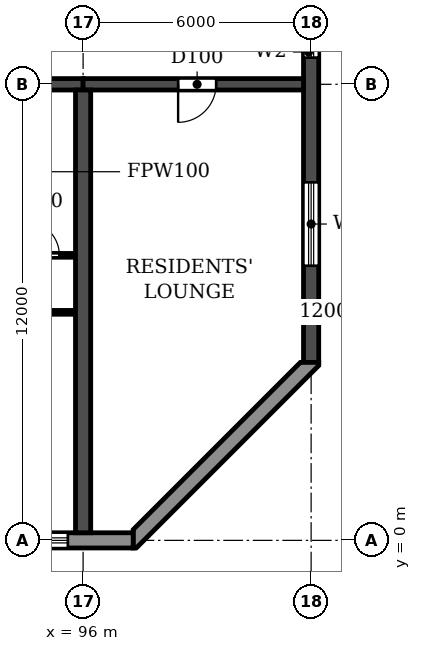
"""IFC4 building model, lengths in metres.
Left out: names, types, materials, properties, quantities, classifications, styles, units other than length and angle.
Written with IfcOpenShell. Run it as: python <this file> out.ifc"""

import sys

from ifc_helpers import new_model, si_unit, direction, frame, frame_2d, origin, place, context, subcontext, project, spatial, polyline, rectangle, outline, extrude, element, fill, save


model = new_model("IFC4")
c1 = context("Model", 3, precision=1e-05, world=origin(), true_north=direction((0.0, 1.0)))
c2 = subcontext(c1, "Body", "Model", "MODEL_VIEW")
j1 = project(units=[si_unit("LENGTHUNIT", "METRE"), si_unit("PLANEANGLEUNIT", "RADIAN")], contexts=[c1])
p1 = place(None, origin())
s1 = spatial("IfcSite", under=j1, at=p1, CompositionType="ELEMENT")
p2 = place(p1, origin())
s2 = spatial("IfcBuilding", under=s1, at=p2, CompositionType="ELEMENT")
p3 = place(p2, frame((0.0, 0.0, 26.7)))
s3 = spatial("IfcBuildingStorey", under=s2, at=p3, CompositionType="ELEMENT", Elevation=26.7)
p4 = place(p3, frame((96.0, 0.2, 0.0), z_axis=(0.0, 0.0, 1.0), x_axis=(0.0, 1.0, 0.0)))
e1 = element("IfcWall", 1, at=p4, inside=s3, PredefinedType="SHEAR", context=c2, shape_type="SweptSolid", body=[
    extrude(rectangle(XDim=11.65, YDim=0.4, at=frame_2d((5.825, 0.0))), origin(), (0.0, 0.0, 1.0), 3.05),
])
p5 = place(p3, frame((102.0, 4.683, 0.0), z_axis=(0.0, 0.0, 1.0), x_axis=(0.0, 1.0, 0.0)))
e2 = element("IfcWall", 2, at=p5, inside=s3, PredefinedType="SHEAR", context=c2, shape_type="SweptSolid", body=[
    extrude(rectangle(XDim=35.434, YDim=0.4, at=frame_2d((17.717, 0.0))), origin(), (0.0, 0.0, 1.0), 3.05),
])
p6 = place(p5, frame((15.917, 0.0, 0.9)))
e3 = element("IfcOpeningElement", 3, at=p6, cuts=e2, PredefinedType="OPENING", context=c2, shape_type="SweptSolid", body=[
    extrude(rectangle(XDim=1.2, YDim=1.5, at=frame_2d((0.6, 0.75))), frame((0.0, 0.21, 0.0), z_axis=(0.0, -1.0, 0.0), x_axis=(1.0, 0.0, 0.0)), (0.0, 0.0, 1.0), 0.42),
])
p7 = place(p5, frame((23.817, 0.0, 0.9)))
e4 = element("IfcOpeningElement", 4, at=p7, cuts=e2, PredefinedType="OPENING", context=c2, shape_type="SweptSolid", body=[
    extrude(rectangle(XDim=1.2, YDim=1.5, at=frame_2d((0.6, 0.75))), frame((0.0, 0.21, 0.0), z_axis=(0.0, -1.0, 0.0), x_axis=(1.0, 0.0, 0.0)), (0.0, 0.0, 1.0), 0.42),
])
p8 = place(p5, frame((8.017, 0.0, 0.9)))
e5 = element("IfcOpeningElement", 5, at=p8, cuts=e2, PredefinedType="OPENING", context=c2, shape_type="SweptSolid", body=[
    extrude(rectangle(XDim=1.2, YDim=1.5, at=frame_2d((0.6, 0.75))), frame((0.0, 0.21, 0.0), z_axis=(0.0, -1.0, 0.0), x_axis=(1.0, 0.0, 0.0)), (0.0, 0.0, 1.0), 0.42),
])
p9 = place(p5, frame((29.493, 0.0, 0.6)))
e6 = element("IfcOpeningElement", 6, at=p9, cuts=e2, PredefinedType="OPENING", context=c2, shape_type="SweptSolid", body=[
    extrude(rectangle(XDim=2.2, YDim=1.8, at=frame_2d((1.1, 0.9))), frame((0.0, 0.21, 0.0), z_axis=(0.0, -1.0, 0.0), x_axis=(1.0, 0.0, 0.0)), (0.0, 0.0, 1.0), 0.42),
])
p10 = place(p5, frame((2.541, 0.0, 0.6)))
e7 = element("IfcOpeningElement", 7, at=p10, cuts=e2, PredefinedType="OPENING", context=c2, shape_type="SweptSolid", body=[
    extrude(rectangle(XDim=2.2, YDim=1.8, at=frame_2d((1.1, 0.9))), frame((0.0, 0.21, 0.0), z_axis=(0.0, -1.0, 0.0), x_axis=(1.0, 0.0, 0.0)), (0.0, 0.0, 1.0), 0.42),
])
p11 = place(p3, frame((90.0, 12.0, 0.0), z_axis=(0.0, 0.0, 1.0), x_axis=(1.0, 0.0, 0.0)))
e8 = element("IfcWall", 8, at=p11, inside=s3, PredefinedType="SHEAR", context=c2, shape_type="SweptSolid", body=[
    extrude(rectangle(XDim=6.0, YDim=0.3, at=frame_2d((3.0, 0.0))), origin(), (0.0, 0.0, 1.0), 2.45),
])
p12 = place(p11, frame((2.45, 0.0, 0.0)))
e9 = element("IfcOpeningElement", 9, at=p12, cuts=e8, PredefinedType="OPENING", context=c2, shape_type="SweptSolid", body=[
    extrude(rectangle(XDim=1.0, YDim=2.1, at=frame_2d((0.5, 1.05))), frame((0.0, 0.16, 0.0), z_axis=(0.0, -1.0, 0.0), x_axis=(1.0, 0.0, 0.0)), (0.0, 0.0, 1.0), 0.32),
])
p13 = place(p3, frame((96.0, 12.0, 0.0), z_axis=(0.0, 0.0, 1.0), x_axis=(1.0, 0.0, 0.0)))
e10 = element("IfcWall", 10, at=p13, inside=s3, PredefinedType="SHEAR", context=c2, shape_type="SweptSolid", body=[
    extrude(rectangle(XDim=5.8, YDim=0.3, at=frame_2d((2.9, 0.0))), origin(), (0.0, 0.0, 1.0), 2.45),
])
p14 = place(p13, frame((2.5, 0.0, 0.0)))
e11 = element("IfcOpeningElement", 11, at=p14, cuts=e10, PredefinedType="OPENING", context=c2, shape_type="SweptSolid", body=[
    extrude(rectangle(XDim=1.0, YDim=2.1, at=frame_2d((0.5, 1.05))), frame((0.0, 0.16, 0.0), z_axis=(0.0, -1.0, 0.0), x_axis=(1.0, 0.0, 0.0)), (0.0, 0.0, 1.0), 0.32),
])
p15 = place(p3, frame((4.683, 0.0, 0.0), z_axis=(0.0, 0.0, 1.0), x_axis=(1.0, 0.0, 0.0)))
e12 = element("IfcWall", 12, at=p15, inside=s3, PredefinedType="STANDARD", context=c2, shape_type="SweptSolid", body=[
    extrude(rectangle(XDim=92.634, YDim=0.4, at=frame_2d((46.317, 0.0))), origin(), (0.0, 0.0, 1.0), 3.05),
])
p16 = place(p15, frame((1.717, 0.0, 0.9)))
e13 = element("IfcOpeningElement", 13, at=p16, cuts=e12, PredefinedType="OPENING", context=c2, shape_type="SweptSolid", body=[
    extrude(rectangle(XDim=2.2, YDim=1.5, at=frame_2d((1.1, 0.75))), frame((0.0, 0.21, 0.0), z_axis=(0.0, -1.0, 0.0), x_axis=(1.0, 0.0, 0.0)), (0.0, 0.0, 1.0), 0.42),
])
p17 = place(p15, frame((4.717, 0.0, 0.9)))
e14 = element("IfcOpeningElement", 14, at=p17, cuts=e12, PredefinedType="OPENING", context=c2, shape_type="SweptSolid", body=[
    extrude(rectangle(XDim=2.2, YDim=1.5, at=frame_2d((1.1, 0.75))), frame((0.0, 0.21, 0.0), z_axis=(0.0, -1.0, 0.0), x_axis=(1.0, 0.0, 0.0)), (0.0, 0.0, 1.0), 0.42),
])
p18 = place(p15, frame((7.717, 0.0, 0.9)))
e15 = element("IfcOpeningElement", 15, at=p18, cuts=e12, PredefinedType="OPENING", context=c2, shape_type="SweptSolid", body=[
    extrude(rectangle(XDim=2.2, YDim=1.5, at=frame_2d((1.1, 0.75))), frame((0.0, 0.21, 0.0), z_axis=(0.0, -1.0, 0.0), x_axis=(1.0, 0.0, 0.0)), (0.0, 0.0, 1.0), 0.42),
])
p19 = place(p15, frame((10.717, 0.0, 0.9)))
e16 = element("IfcOpeningElement", 16, at=p19, cuts=e12, PredefinedType="OPENING", context=c2, shape_type="SweptSolid", body=[
    extrude(rectangle(XDim=2.2, YDim=1.5, at=frame_2d((1.1, 0.75))), frame((0.0, 0.21, 0.0), z_axis=(0.0, -1.0, 0.0), x_axis=(1.0, 0.0, 0.0)), (0.0, 0.0, 1.0), 0.42),
])
p20 = place(p15, frame((13.717, 0.0, 0.9)))
e17 = element("IfcOpeningElement", 17, at=p20, cuts=e12, PredefinedType="OPENING", context=c2, shape_type="SweptSolid", body=[
    extrude(rectangle(XDim=2.2, YDim=1.5, at=frame_2d((1.1, 0.75))), frame((0.0, 0.21, 0.0), z_axis=(0.0, -1.0, 0.0), x_axis=(1.0, 0.0, 0.0)), (0.0, 0.0, 1.0), 0.42),
])
p21 = place(p15, frame((16.717, 0.0, 0.9)))
e18 = element("IfcOpeningElement", 18, at=p21, cuts=e12, PredefinedType="OPENING", context=c2, shape_type="SweptSolid", body=[
    extrude(rectangle(XDim=2.2, YDim=1.5, at=frame_2d((1.1, 0.75))), frame((0.0, 0.21, 0.0), z_axis=(0.0, -1.0, 0.0), x_axis=(1.0, 0.0, 0.0)), (0.0, 0.0, 1.0), 0.42),
])
p22 = place(p15, frame((19.917, 0.0, 0.0)))
e19 = element("IfcOpeningElement", 19, at=p22, cuts=e12, PredefinedType="OPENING", context=c2, shape_type="SweptSolid", body=[
    extrude(rectangle(XDim=1.8, YDim=2.4, at=frame_2d((0.9, 1.2))), frame((0.0, 0.21, 0.0), z_axis=(0.0, -1.0, 0.0), x_axis=(1.0, 0.0, 0.0)), (0.0, 0.0, 1.0), 0.42),
])
p23 = place(p15, frame((22.717, 0.0, 0.9)))
e20 = element("IfcOpeningElement", 20, at=p23, cuts=e12, PredefinedType="OPENING", context=c2, shape_type="SweptSolid", body=[
    extrude(rectangle(XDim=2.2, YDim=1.5, at=frame_2d((1.1, 0.75))), frame((0.0, 0.21, 0.0), z_axis=(0.0, -1.0, 0.0), x_axis=(1.0, 0.0, 0.0)), (0.0, 0.0, 1.0), 0.42),
])
p24 = place(p15, frame((25.717, 0.0, 0.9)))
e21 = element("IfcOpeningElement", 21, at=p24, cuts=e12, PredefinedType="OPENING", context=c2, shape_type="SweptSolid", body=[
    extrude(rectangle(XDim=2.2, YDim=1.5, at=frame_2d((1.1, 0.75))), frame((0.0, 0.21, 0.0), z_axis=(0.0, -1.0, 0.0), x_axis=(1.0, 0.0, 0.0)), (0.0, 0.0, 1.0), 0.42),
])
p25 = place(p15, frame((28.717, 0.0, 0.9)))
e22 = element("IfcOpeningElement", 22, at=p25, cuts=e12, PredefinedType="OPENING", context=c2, shape_type="SweptSolid", body=[
    extrude(rectangle(XDim=2.2, YDim=1.5, at=frame_2d((1.1, 0.75))), frame((0.0, 0.21, 0.0), z_axis=(0.0, -1.0, 0.0), x_axis=(1.0, 0.0, 0.0)), (0.0, 0.0, 1.0), 0.42),
])
p26 = place(p15, frame((31.917, 0.0, 0.0)))
e23 = element("IfcOpeningElement", 23, at=p26, cuts=e12, PredefinedType="OPENING", context=c2, shape_type="SweptSolid", body=[
    extrude(rectangle(XDim=1.8, YDim=2.4, at=frame_2d((0.9, 1.2))), frame((0.0, 0.21, 0.0), z_axis=(0.0, -1.0, 0.0), x_axis=(1.0, 0.0, 0.0)), (0.0, 0.0, 1.0), 0.42),
])
p27 = place(p15, frame((34.717, 0.0, 0.9)))
e24 = element("IfcOpeningElement", 24, at=p27, cuts=e12, PredefinedType="OPENING", context=c2, shape_type="SweptSolid", body=[
    extrude(rectangle(XDim=2.2, YDim=1.5, at=frame_2d((1.1, 0.75))), frame((0.0, 0.21, 0.0), z_axis=(0.0, -1.0, 0.0), x_axis=(1.0, 0.0, 0.0)), (0.0, 0.0, 1.0), 0.42),
])
p28 = place(p15, frame((37.717, 0.0, 0.9)))
e25 = element("IfcOpeningElement", 25, at=p28, cuts=e12, PredefinedType="OPENING", context=c2, shape_type="SweptSolid", body=[
    extrude(rectangle(XDim=2.2, YDim=1.5, at=frame_2d((1.1, 0.75))), frame((0.0, 0.21, 0.0), z_axis=(0.0, -1.0, 0.0), x_axis=(1.0, 0.0, 0.0)), (0.0, 0.0, 1.0), 0.42),
])
p29 = place(p15, frame((40.717, 0.0, 0.9)))
e26 = element("IfcOpeningElement", 26, at=p29, cuts=e12, PredefinedType="OPENING", context=c2, shape_type="SweptSolid", body=[
    extrude(rectangle(XDim=2.2, YDim=1.5, at=frame_2d((1.1, 0.75))), frame((0.0, 0.21, 0.0), z_axis=(0.0, -1.0, 0.0), x_axis=(1.0, 0.0, 0.0)), (0.0, 0.0, 1.0), 0.42),
])
p30 = place(p15, frame((43.917, 0.0, 0.0)))
e27 = element("IfcOpeningElement", 27, at=p30, cuts=e12, PredefinedType="OPENING", context=c2, shape_type="SweptSolid", body=[
    extrude(rectangle(XDim=1.8, YDim=2.4, at=frame_2d((0.9, 1.2))), frame((0.0, 0.21, 0.0), z_axis=(0.0, -1.0, 0.0), x_axis=(1.0, 0.0, 0.0)), (0.0, 0.0, 1.0), 0.42),
])
p31 = place(p15, frame((46.717, 0.0, 0.9)))
e28 = element("IfcOpeningElement", 28, at=p31, cuts=e12, PredefinedType="OPENING", context=c2, shape_type="SweptSolid", body=[
    extrude(rectangle(XDim=2.2, YDim=1.5, at=frame_2d((1.1, 0.75))), frame((0.0, 0.21, 0.0), z_axis=(0.0, -1.0, 0.0), x_axis=(1.0, 0.0, 0.0)), (0.0, 0.0, 1.0), 0.42),
])
p32 = place(p15, frame((49.717, 0.0, 0.9)))
e29 = element("IfcOpeningElement", 29, at=p32, cuts=e12, PredefinedType="OPENING", context=c2, shape_type="SweptSolid", body=[
    extrude(rectangle(XDim=2.2, YDim=1.5, at=frame_2d((1.1, 0.75))), frame((0.0, 0.21, 0.0), z_axis=(0.0, -1.0, 0.0), x_axis=(1.0, 0.0, 0.0)), (0.0, 0.0, 1.0), 0.42),
])
p33 = place(p15, frame((52.717, 0.0, 0.9)))
e30 = element("IfcOpeningElement", 30, at=p33, cuts=e12, PredefinedType="OPENING", context=c2, shape_type="SweptSolid", body=[
    extrude(rectangle(XDim=2.2, YDim=1.5, at=frame_2d((1.1, 0.75))), frame((0.0, 0.21, 0.0), z_axis=(0.0, -1.0, 0.0), x_axis=(1.0, 0.0, 0.0)), (0.0, 0.0, 1.0), 0.42),
])
p34 = place(p15, frame((55.717, 0.0, 0.9)))
e31 = element("IfcOpeningElement", 31, at=p34, cuts=e12, PredefinedType="OPENING", context=c2, shape_type="SweptSolid", body=[
    extrude(rectangle(XDim=2.2, YDim=1.5, at=frame_2d((1.1, 0.75))), frame((0.0, 0.21, 0.0), z_axis=(0.0, -1.0, 0.0), x_axis=(1.0, 0.0, 0.0)), (0.0, 0.0, 1.0), 0.42),
])
p35 = place(p15, frame((58.917, 0.0, 0.0)))
e32 = element("IfcOpeningElement", 32, at=p35, cuts=e12, PredefinedType="OPENING", context=c2, shape_type="SweptSolid", body=[
    extrude(rectangle(XDim=1.8, YDim=2.4, at=frame_2d((0.9, 1.2))), frame((0.0, 0.21, 0.0), z_axis=(0.0, -1.0, 0.0), x_axis=(1.0, 0.0, 0.0)), (0.0, 0.0, 1.0), 0.42),
])
p36 = place(p15, frame((61.717, 0.0, 0.9)))
e33 = element("IfcOpeningElement", 33, at=p36, cuts=e12, PredefinedType="OPENING", context=c2, shape_type="SweptSolid", body=[
    extrude(rectangle(XDim=2.2, YDim=1.5, at=frame_2d((1.1, 0.75))), frame((0.0, 0.21, 0.0), z_axis=(0.0, -1.0, 0.0), x_axis=(1.0, 0.0, 0.0)), (0.0, 0.0, 1.0), 0.42),
])
p37 = place(p15, frame((64.717, 0.0, 0.9)))
e34 = element("IfcOpeningElement", 34, at=p37, cuts=e12, PredefinedType="OPENING", context=c2, shape_type="SweptSolid", body=[
    extrude(rectangle(XDim=2.2, YDim=1.5, at=frame_2d((1.1, 0.75))), frame((0.0, 0.21, 0.0), z_axis=(0.0, -1.0, 0.0), x_axis=(1.0, 0.0, 0.0)), (0.0, 0.0, 1.0), 0.42),
])
p38 = place(p15, frame((67.717, 0.0, 0.9)))
e35 = element("IfcOpeningElement", 35, at=p38, cuts=e12, PredefinedType="OPENING", context=c2, shape_type="SweptSolid", body=[
    extrude(rectangle(XDim=2.2, YDim=1.5, at=frame_2d((1.1, 0.75))), frame((0.0, 0.21, 0.0), z_axis=(0.0, -1.0, 0.0), x_axis=(1.0, 0.0, 0.0)), (0.0, 0.0, 1.0), 0.42),
])
p39 = place(p15, frame((70.917, 0.0, 0.0)))
e36 = element("IfcOpeningElement", 36, at=p39, cuts=e12, PredefinedType="OPENING", context=c2, shape_type="SweptSolid", body=[
    extrude(rectangle(XDim=1.8, YDim=2.4, at=frame_2d((0.9, 1.2))), frame((0.0, 0.21, 0.0), z_axis=(0.0, -1.0, 0.0), x_axis=(1.0, 0.0, 0.0)), (0.0, 0.0, 1.0), 0.42),
])
p40 = place(p15, frame((73.717, 0.0, 0.9)))
e37 = element("IfcOpeningElement", 37, at=p40, cuts=e12, PredefinedType="OPENING", context=c2, shape_type="SweptSolid", body=[
    extrude(rectangle(XDim=2.2, YDim=1.5, at=frame_2d((1.1, 0.75))), frame((0.0, 0.21, 0.0), z_axis=(0.0, -1.0, 0.0), x_axis=(1.0, 0.0, 0.0)), (0.0, 0.0, 1.0), 0.42),
])
p41 = place(p15, frame((76.717, 0.0, 0.9)))
e38 = element("IfcOpeningElement", 38, at=p41, cuts=e12, PredefinedType="OPENING", context=c2, shape_type="SweptSolid", body=[
    extrude(rectangle(XDim=2.2, YDim=1.5, at=frame_2d((1.1, 0.75))), frame((0.0, 0.21, 0.0), z_axis=(0.0, -1.0, 0.0), x_axis=(1.0, 0.0, 0.0)), (0.0, 0.0, 1.0), 0.42),
])
p42 = place(p15, frame((79.717, 0.0, 0.9)))
e39 = element("IfcOpeningElement", 39, at=p42, cuts=e12, PredefinedType="OPENING", context=c2, shape_type="SweptSolid", body=[
    extrude(rectangle(XDim=2.2, YDim=1.5, at=frame_2d((1.1, 0.75))), frame((0.0, 0.21, 0.0), z_axis=(0.0, -1.0, 0.0), x_axis=(1.0, 0.0, 0.0)), (0.0, 0.0, 1.0), 0.42),
])
p43 = place(p15, frame((82.717, 0.0, 0.9)))
e40 = element("IfcOpeningElement", 40, at=p43, cuts=e12, PredefinedType="OPENING", context=c2, shape_type="SweptSolid", body=[
    extrude(rectangle(XDim=2.2, YDim=1.5, at=frame_2d((1.1, 0.75))), frame((0.0, 0.21, 0.0), z_axis=(0.0, -1.0, 0.0), x_axis=(1.0, 0.0, 0.0)), (0.0, 0.0, 1.0), 0.42),
])
p44 = place(p15, frame((85.717, 0.0, 0.9)))
e41 = element("IfcOpeningElement", 41, at=p44, cuts=e12, PredefinedType="OPENING", context=c2, shape_type="SweptSolid", body=[
    extrude(rectangle(XDim=2.2, YDim=1.5, at=frame_2d((1.1, 0.75))), frame((0.0, 0.21, 0.0), z_axis=(0.0, -1.0, 0.0), x_axis=(1.0, 0.0, 0.0)), (0.0, 0.0, 1.0), 0.42),
])
p45 = place(p15, frame((88.717, 0.0, 0.9)))
e42 = element("IfcOpeningElement", 42, at=p45, cuts=e12, PredefinedType="OPENING", context=c2, shape_type="SweptSolid", body=[
    extrude(rectangle(XDim=2.2, YDim=1.5, at=frame_2d((1.1, 0.75))), frame((0.0, 0.21, 0.0), z_axis=(0.0, -1.0, 0.0), x_axis=(1.0, 0.0, 0.0)), (0.0, 0.0, 1.0), 0.42),
])
p46 = place(p3, origin())
e43 = element("IfcWall", 43, at=p46, inside=s3, PredefinedType="STANDARD", context=c2, shape_type="SweptSolid", body=[
    extrude(outline(polyline([(97.317, -0.2), (97.4, -0.2), (102.2, 4.6), (102.2, 4.683), (101.717, 4.683), (97.317, 0.283), (97.317, -0.2)])), origin(), (0.0, 0.0, 1.0), 3.05),
])
p47 = place(p3, frame((92.95, 6.0, 0.0), z_axis=(0.0, 0.0, 1.0), x_axis=(1.0, 0.0, 0.0)))
e44 = element("IfcWall", 44, at=p47, inside=s3, PredefinedType="PARTITIONING", context=c2, shape_type="SweptSolid", body=[
    extrude(rectangle(XDim=2.84, YDim=0.1, at=frame_2d((1.42, 0.0))), origin(), (0.0, 0.0, 1.0), 3.05),
])
p48 = place(p47, frame((0.55, 0.0, 0.0)))
e45 = element("IfcOpeningElement", 45, at=p48, cuts=e44, PredefinedType="OPENING", context=c2, shape_type="SweptSolid", body=[
    extrude(rectangle(XDim=0.9, YDim=2.1, at=frame_2d((0.45, 1.05))), frame((0.0, 0.06, 0.0), z_axis=(0.0, -1.0, 0.0), x_axis=(1.0, 0.0, 0.0)), (0.0, 0.0, 1.0), 0.12),
])
p49 = place(p3, frame((93.8, 7.5, 0.0), z_axis=(0.0, 0.0, 1.0), x_axis=(1.0, 0.0, 0.0)))
e46 = element("IfcWall", 46, at=p49, inside=s3, PredefinedType="PARTITIONING", context=c2, shape_type="SweptSolid", body=[
    extrude(rectangle(XDim=1.99, YDim=0.1, at=frame_2d((0.995, 0.0))), origin(), (0.0, 0.0, 1.0), 3.05),
])
p50 = place(p49, frame((0.675, 0.0, 0.0)))
e47 = element("IfcOpeningElement", 47, at=p50, cuts=e46, PredefinedType="OPENING", context=c2, shape_type="SweptSolid", body=[
    extrude(rectangle(XDim=0.9, YDim=2.1, at=frame_2d((0.45, 1.05))), frame((0.0, 0.06, 0.0), z_axis=(0.0, -1.0, 0.0), x_axis=(1.0, 0.0, 0.0)), (0.0, 0.0, 1.0), 0.12),
])
p51 = place(p45, origin())
e48 = element("IfcWindow", 48, at=p51, inside=s3, PartitioningType="DOUBLE_PANEL_HORIZONTAL", PredefinedType="WINDOW", context=c2, shape_type="SweptSolid", body=[
    extrude(rectangle(XDim=2.2, YDim=1.5, at=frame_2d((1.1, 0.75))), frame((0.0, 0.03, 0.0), z_axis=(0.0, -1.0, 0.0), x_axis=(1.0, 0.0, 0.0)), (0.0, 0.0, 1.0), 0.06),
])
fill(e42, e48)
p52 = place(p8, origin())
e49 = element("IfcWindow", 49, at=p52, inside=s3, PartitioningType="SINGLE_PANEL", PredefinedType="WINDOW", context=c2, shape_type="SweptSolid", body=[
    extrude(rectangle(XDim=1.2, YDim=1.5, at=frame_2d((0.6, 0.75))), frame((0.0, 0.03, 0.0), z_axis=(0.0, -1.0, 0.0), x_axis=(1.0, 0.0, 0.0)), (0.0, 0.0, 1.0), 0.06),
])
fill(e5, e49)
p53 = place(p10, origin())
e50 = element("IfcWindow", 50, at=p53, inside=s3, PartitioningType="DOUBLE_PANEL_HORIZONTAL", PredefinedType="WINDOW", context=c2, shape_type="SweptSolid", body=[
    extrude(rectangle(XDim=2.2, YDim=1.8, at=frame_2d((1.1, 0.9))), frame((0.0, 0.03, 0.0), z_axis=(0.0, -1.0, 0.0), x_axis=(1.0, 0.0, 0.0)), (0.0, 0.0, 1.0), 0.06),
])
fill(e7, e50)
p54 = place(p50, origin())
e51 = element("IfcDoor", 51, at=p54, inside=s3, OperationType="SINGLE_SWING_LEFT", PredefinedType="DOOR", context=c2, shape_type="SweptSolid", body=[
    extrude(rectangle(XDim=0.9, YDim=2.1, at=frame_2d((0.45, 1.05))), frame((0.0, 0.025, 0.0), z_axis=(0.0, -1.0, 0.0), x_axis=(1.0, 0.0, 0.0)), (0.0, 0.0, 1.0), 0.05),
])
fill(e47, e51)
p55 = place(p14, frame((1.0, 0.0, 0.0), z_axis=(0.0, 0.0, 1.0), x_axis=(-1.0, 0.0, 0.0)))
e52 = element("IfcDoor", 52, at=p55, inside=s3, OperationType="SINGLE_SWING_RIGHT", PredefinedType="DOOR", context=c2, shape_type="SweptSolid", body=[
    extrude(rectangle(XDim=1.0, YDim=2.1, at=frame_2d((0.5, 1.05))), frame((0.0, 0.025, 0.0), z_axis=(0.0, -1.0, 0.0), x_axis=(1.0, 0.0, 0.0)), (0.0, 0.0, 1.0), 0.05),
])
fill(e11, e52)
save(model, sys.argv[1])
